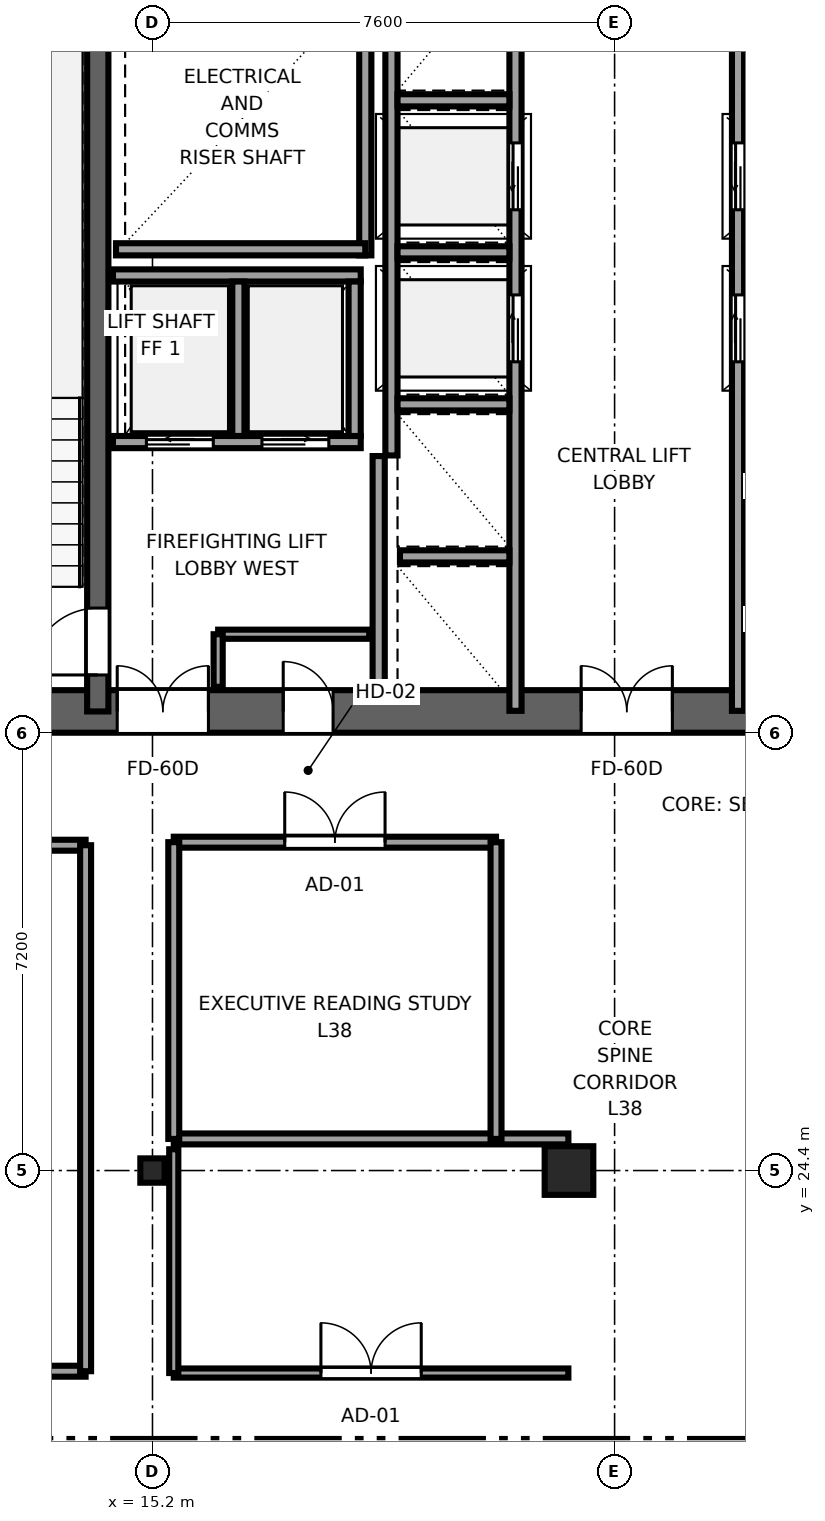
"""IFC4 building model, lengths in metres.
Left out: names, types, materials, properties, quantities, classifications, styles, units other than length and angle.
Written with IfcOpenShell. Run it as: python <this file> out.ifc"""

import sys

from ifc_helpers import new_model, si_unit, direction, frame, frame_2d, origin, origin_2d, place, context, subcontext, project, spatial, rectangle, i_section, extrude, source, transform, mapped, element, fill, save


model = new_model("IFC4")
c1 = context("Model", 3, precision=1e-05, world=origin(), true_north=direction((0.0, 1.0)))
c2 = subcontext(c1, "Body", "Model", "MODEL_VIEW")
j1 = project(units=[si_unit("LENGTHUNIT", "METRE"), si_unit("PLANEANGLEUNIT", "RADIAN")], contexts=[c1])
p1 = place(None, origin())
s1 = spatial("IfcSite", under=j1, at=p1, CompositionType="ELEMENT")
p2 = place(p1, origin())
s2 = spatial("IfcBuilding", under=s1, at=p2, CompositionType="ELEMENT")
p3 = place(p2, frame((0.0, 0.0, 147.05)))
s3 = spatial("IfcBuildingStorey", under=s2, at=p3, CompositionType="ELEMENT", Elevation=147.05)
p4 = place(p3, frame((9.8, 31.95, 0.0), z_axis=(0.0, 0.0, 1.0), x_axis=(1.0, 0.0, 0.0)))
e1 = element("IfcWall", 1, at=p4, inside=s3, PredefinedType="SHEAR", context=c2, shape_type="SweptSolid", body=[
    extrude(rectangle(XDim=26.4, YDim=0.7, at=frame_2d((13.2, 0.0))), origin(), (0.0, 0.0, 1.0), 3.55),
])
p5 = place(p4, frame((6.32, 0.0, 0.0), z_axis=(0.0, 0.0, 1.0), x_axis=(-1.0, 0.0, 0.0)))
e2 = element("IfcOpeningElement", 2, at=p5, cuts=e1, PredefinedType="OPENING", context=c2, shape_type="SweptSolid", body=[
    extrude(rectangle(XDim=1.5, YDim=2.04, at=frame_2d((0.75, 1.02))), frame((0.0, 0.36, 0.0), z_axis=(0.0, -1.0, 0.0), x_axis=(1.0, 0.0, 0.0)), (0.0, 0.0, 1.0), 0.72),
])
p6 = place(p4, frame((13.95, 0.0, 0.0), z_axis=(0.0, 0.0, 1.0), x_axis=(-1.0, 0.0, 0.0)))
e3 = element("IfcOpeningElement", 3, at=p6, cuts=e1, PredefinedType="OPENING", context=c2, shape_type="SweptSolid", body=[
    extrude(rectangle(XDim=1.5, YDim=2.04, at=frame_2d((0.75, 1.02))), frame((0.0, 0.36, 0.0), z_axis=(0.0, -1.0, 0.0), x_axis=(1.0, 0.0, 0.0)), (0.0, 0.0, 1.0), 0.72),
])
p7 = place(p4, frame((21.58, 0.0, 0.0), z_axis=(0.0, 0.0, 1.0), x_axis=(-1.0, 0.0, 0.0)))
e4 = element("IfcOpeningElement", 4, at=p7, cuts=e1, PredefinedType="OPENING", context=c2, shape_type="SweptSolid", body=[
    extrude(rectangle(XDim=1.5, YDim=2.04, at=frame_2d((0.75, 1.02))), frame((0.0, 0.36, 0.0), z_axis=(0.0, -1.0, 0.0), x_axis=(1.0, 0.0, 0.0)), (0.0, 0.0, 1.0), 0.72),
])
p8 = place(p4, frame((8.37, 0.0, 0.0), z_axis=(0.0, 0.0, 1.0), x_axis=(-1.0, 0.0, 0.0)))
e5 = element("IfcOpeningElement", 5, at=p8, cuts=e1, PredefinedType="OPENING", context=c2, shape_type="SweptSolid", body=[
    extrude(rectangle(XDim=0.82, YDim=2.01, at=frame_2d((0.41, 1.005))), frame((0.0, 0.36, 0.0), z_axis=(0.0, -1.0, 0.0), x_axis=(1.0, 0.0, 0.0)), (0.0, 0.0, 1.0), 0.72),
])
p9 = place(p4, frame((18.87, 0.0, 0.0), z_axis=(0.0, 0.0, 1.0), x_axis=(-1.0, 0.0, 0.0)))
e6 = element("IfcOpeningElement", 6, at=p9, cuts=e1, PredefinedType="OPENING", context=c2, shape_type="SweptSolid", body=[
    extrude(rectangle(XDim=0.82, YDim=2.01, at=frame_2d((0.41, 1.005))), frame((0.0, 0.36, 0.0), z_axis=(0.0, -1.0, 0.0), x_axis=(1.0, 0.0, 0.0)), (0.0, 0.0, 1.0), 0.72),
])
p10 = place(p3, frame((14.3, 31.95, 0.0), z_axis=(0.0, 0.0, 1.0), x_axis=(0.0, 1.0, 0.0)))
e7 = element("IfcWall", 7, at=p10, inside=s3, PredefinedType="SHEAR", context=c2, shape_type="SweptSolid", body=[
    extrude(rectangle(XDim=12.9, YDim=0.35, at=frame_2d((6.45, 0.0))), origin(), (0.0, 0.0, 1.0), 3.55),
])
p11 = place(p10, frame((0.6, 0.0, 0.0)))
e8 = element("IfcOpeningElement", 8, at=p11, cuts=e7, PredefinedType="OPENING", context=c2, shape_type="SweptSolid", body=[
    extrude(rectangle(XDim=1.1, YDim=2.12, at=frame_2d((0.55, 1.06))), frame((0.0, 0.185, 0.0), z_axis=(0.0, -1.0, 0.0), x_axis=(1.0, 0.0, 0.0)), (0.0, 0.0, 1.0), 0.37),
])
m1 = source(origin(), c2, "Body", "SweptSolid", [
    extrude(i_section(OverallWidth=0.4, OverallDepth=0.4, WebThickness=0.02, FlangeThickness=0.035, at=origin_2d()), origin(), (0.0, 0.0, 1.0), 3.55),
])
p12 = place(p3, frame((15.2, 24.4, 0.0), z_axis=(0.0, 0.0, 1.0), x_axis=(1.0, 0.0, 0.0)))
e9 = element("IfcColumn", 9, at=p12, inside=s3, PredefinedType="COLUMN", context=c2, shape_type="MappedRepresentation", body=[
    mapped(m1, transform((0.0, 0.0, 0.0), x_axis=(1.0, 0.0, 0.0), y_axis=(0.0, 1.0, 0.0), z_axis=(0.0, 0.0, 1.0), scale=1.0)),
])
m2 = source(origin(), c2, "Body", "SweptSolid", [
    extrude(rectangle(XDim=0.8, YDim=0.8, at=origin_2d()), origin(), (0.0, 0.0, 1.0), 3.55),
])
p13 = place(p3, frame((22.05, 24.4, 0.0), z_axis=(0.0, 0.0, 1.0), x_axis=(1.0, 0.0, 0.0)))
e10 = element("IfcColumn", 10, at=p13, inside=s3, PredefinedType="COLUMN", context=c2, shape_type="MappedRepresentation", body=[
    mapped(m2, transform((0.0, 0.0, 0.0), x_axis=(1.0, 0.0, 0.0), y_axis=(0.0, 1.0, 0.0), z_axis=(0.0, 0.0, 1.0), scale=1.0)),
])
p14 = place(p3, frame((18.7, 39.45, 0.0), z_axis=(0.0, 0.0, 1.0), x_axis=(0.0, 1.0, 0.0)))
e11 = element("IfcWall", 11, at=p14, inside=s3, PredefinedType="SOLIDWALL", context=c2, shape_type="SweptSolid", body=[
    extrude(rectangle(XDim=4.4, YDim=0.2, at=frame_2d((2.2, 0.0))), origin(), (0.0, 0.0, 1.0), 3.37),
])
p15 = place(p3, frame((14.6, 39.55, 0.0), z_axis=(0.0, 0.0, 1.0), x_axis=(1.0, 0.0, 0.0)))
e12 = element("IfcWall", 12, at=p15, inside=s3, PredefinedType="SOLIDWALL", context=c2, shape_type="SweptSolid", body=[
    extrude(rectangle(XDim=4.1, YDim=0.2, at=frame_2d((2.05, 0.0))), origin(), (0.0, 0.0, 1.0), 3.37),
])
p16 = place(p3, frame((18.92, 32.304, 0.0), z_axis=(0.0, 0.0, 1.0), x_axis=(0.0, 1.0, 0.0)))
e13 = element("IfcWall", 13, at=p16, inside=s3, PredefinedType="SOLIDWALL", context=c2, shape_type="SweptSolid", body=[
    extrude(rectangle(XDim=3.846, YDim=0.2, at=frame_2d((1.923, 0.0))), origin(), (0.0, 0.0, 1.0), 3.37),
])
p17 = place(p3, frame((21.17, 31.96, 0.0), z_axis=(0.0, 0.0, 1.0), x_axis=(0.0, 1.0, 0.0)))
e14 = element("IfcWall", 14, at=p17, inside=s3, PredefinedType="SOLIDWALL", context=c2, shape_type="SweptSolid", body=[
    extrude(rectangle(XDim=12.58, YDim=0.2, at=frame_2d((6.29, 0.0))), origin(), (0.0, 0.0, 1.0), 3.37),
])
p18 = place(p17, frame((5.74, 0.0, 0.0)))
e15 = element("IfcOpeningElement", 15, at=p18, cuts=e14, PredefinedType="OPENING", context=c2, shape_type="SweptSolid", body=[
    extrude(rectangle(XDim=1.1, YDim=2.12, at=frame_2d((0.55, 1.06))), frame((0.0, 0.11, 0.0), z_axis=(0.0, -1.0, 0.0), x_axis=(1.0, 0.0, 0.0)), (0.0, 0.0, 1.0), 0.22),
])
p19 = place(p17, frame((8.24, 0.0, 0.0)))
e16 = element("IfcOpeningElement", 16, at=p19, cuts=e14, PredefinedType="OPENING", context=c2, shape_type="SweptSolid", body=[
    extrude(rectangle(XDim=1.1, YDim=2.12, at=frame_2d((0.55, 1.06))), frame((0.0, 0.11, 0.0), z_axis=(0.0, -1.0, 0.0), x_axis=(1.0, 0.0, 0.0)), (0.0, 0.0, 1.0), 0.22),
])
p20 = place(p3, frame((19.13, 36.16, 0.0), z_axis=(0.0, 0.0, 1.0), x_axis=(0.0, 1.0, 0.0)))
e17 = element("IfcWall", 17, at=p20, inside=s3, PredefinedType="SOLIDWALL", context=c2, shape_type="SweptSolid", body=[
    extrude(rectangle(XDim=8.336, YDim=0.2, at=frame_2d((4.168, 0.0))), origin(), (0.0, 0.0, 1.0), 3.37),
])
p21 = place(p3, frame((19.27, 34.5, 0.0), z_axis=(0.0, 0.0, 1.0), x_axis=(1.0, 0.0, 0.0)))
e18 = element("IfcWall", 18, at=p21, inside=s3, PredefinedType="SOLIDWALL", context=c2, shape_type="SweptSolid", body=[
    extrude(rectangle(XDim=1.8, YDim=0.2, at=frame_2d((0.9, 0.0))), origin(), (0.0, 0.0, 1.0), 3.37),
])
for number, where, z_axis, x_axis in (
    (19, (19.23, 37.0, 0.0), (0.0, 0.0, 1.0), (1.0, 0.0, 0.0)),
    (20, (19.23, 39.5, 0.0), (0.0, 0.0, 1.0), (1.0, 0.0, 0.0)),
    (21, (19.23, 42.0, 0.0), (0.0, 0.0, 1.0), (1.0, 0.0, 0.0)),
):
    element("IfcWall", number, at=place(p3, frame(where, z_axis=z_axis, x_axis=x_axis)), inside=s3, PredefinedType="SOLIDWALL", context=c2, shape_type="SweptSolid", body=[
        extrude(rectangle(XDim=1.84, YDim=0.2, at=frame_2d((0.92, 0.0))), origin(), (0.0, 0.0, 1.0), 3.37),
    ])
p22 = place(p3, frame((14.55, 36.38, 0.0), z_axis=(0.0, 0.0, 1.0), x_axis=(1.0, 0.0, 0.0)))
e22 = element("IfcWall", 22, at=p22, inside=s3, PredefinedType="SOLIDWALL", context=c2, shape_type="SweptSolid", body=[
    extrude(rectangle(XDim=4.075, YDim=0.2, at=frame_2d((2.038, 0.0))), origin(), (0.0, 0.0, 1.0), 3.37),
])
p23 = place(p22, frame((0.55, 0.0, 0.0)))
e23 = element("IfcOpeningElement", 23, at=p23, cuts=e22, PredefinedType="OPENING", context=c2, shape_type="SweptSolid", body=[
    extrude(rectangle(XDim=1.1, YDim=2.12, at=frame_2d((0.55, 1.06))), frame((0.0, 0.11, 0.0), z_axis=(0.0, -1.0, 0.0), x_axis=(1.0, 0.0, 0.0)), (0.0, 0.0, 1.0), 0.22),
])
p24 = place(p22, frame((2.45, 0.0, 0.0)))
e24 = element("IfcOpeningElement", 24, at=p24, cuts=e22, PredefinedType="OPENING", context=c2, shape_type="SweptSolid", body=[
    extrude(rectangle(XDim=1.1, YDim=2.12, at=frame_2d((0.55, 1.06))), frame((0.0, 0.11, 0.0), z_axis=(0.0, -1.0, 0.0), x_axis=(1.0, 0.0, 0.0)), (0.0, 0.0, 1.0), 0.22),
])
p25 = place(p3, frame((14.55, 39.12, 0.0), z_axis=(0.0, 0.0, 1.0), x_axis=(1.0, 0.0, 0.0)))
e25 = element("IfcWall", 25, at=p25, inside=s3, PredefinedType="SOLIDWALL", context=c2, shape_type="SweptSolid", body=[
    extrude(rectangle(XDim=4.075, YDim=0.2, at=frame_2d((2.038, 0.0))), origin(), (0.0, 0.0, 1.0), 3.37),
])
for number, where, z_axis, x_axis in (
    (26, (18.525, 36.48, 0.0), (0.0, 0.0, 1.0), (0.0, 1.0, 0.0)),
    (27, (16.613, 36.48, 0.0), (0.0, 0.0, 1.0), (0.0, 1.0, 0.0)),
):
    element("IfcWall", number, at=place(p3, frame(where, z_axis=z_axis, x_axis=x_axis)), inside=s3, PredefinedType="SOLIDWALL", context=c2, shape_type="SweptSolid", body=[
        extrude(rectangle(XDim=2.54, YDim=0.2, at=frame_2d((1.27, 0.0))), origin(), (0.0, 0.0, 1.0), 3.37),
    ])
p26 = place(p3, frame((24.83, 31.96, 0.0), z_axis=(0.0, 0.0, 1.0), x_axis=(0.0, 1.0, 0.0)))
e28 = element("IfcWall", 28, at=p26, inside=s3, PredefinedType="SOLIDWALL", context=c2, shape_type="SweptSolid", body=[
    extrude(rectangle(XDim=12.58, YDim=0.2, at=frame_2d((6.29, 0.0))), origin(), (0.0, 0.0, 1.0), 3.37),
])
p27 = place(p26, frame((5.74, 0.0, 0.0)))
e29 = element("IfcOpeningElement", 29, at=p27, cuts=e28, PredefinedType="OPENING", context=c2, shape_type="SweptSolid", body=[
    extrude(rectangle(XDim=1.1, YDim=2.12, at=frame_2d((0.55, 1.06))), frame((0.0, 0.11, 0.0), z_axis=(0.0, -1.0, 0.0), x_axis=(1.0, 0.0, 0.0)), (0.0, 0.0, 1.0), 0.22),
])
p28 = place(p26, frame((8.24, 0.0, 0.0)))
e30 = element("IfcOpeningElement", 30, at=p28, cuts=e28, PredefinedType="OPENING", context=c2, shape_type="SweptSolid", body=[
    extrude(rectangle(XDim=1.1, YDim=2.12, at=frame_2d((0.55, 1.06))), frame((0.0, 0.11, 0.0), z_axis=(0.0, -1.0, 0.0), x_axis=(1.0, 0.0, 0.0)), (0.0, 0.0, 1.0), 0.22),
])
p29 = place(p3, frame((24.93, 34.5, 0.0), z_axis=(0.0, 0.0, 1.0), x_axis=(1.0, 0.0, 0.0)))
e31 = element("IfcWall", 31, at=p29, inside=s3, PredefinedType="SOLIDWALL", context=c2, shape_type="SweptSolid", body=[
    extrude(rectangle(XDim=1.8, YDim=0.2, at=frame_2d((0.9, 0.0))), origin(), (0.0, 0.0, 1.0), 3.37),
])
for number, where, z_axis, x_axis in (
    (32, (24.93, 37.0, 0.0), (0.0, 0.0, 1.0), (1.0, 0.0, 0.0)),
    (33, (24.93, 39.5, 0.0), (0.0, 0.0, 1.0), (1.0, 0.0, 0.0)),
    (34, (24.93, 42.0, 0.0), (0.0, 0.0, 1.0), (1.0, 0.0, 0.0)),
):
    element("IfcWall", number, at=place(p3, frame(where, z_axis=z_axis, x_axis=x_axis)), inside=s3, PredefinedType="SOLIDWALL", context=c2, shape_type="SweptSolid", body=[
        extrude(rectangle(XDim=1.84, YDim=0.2, at=frame_2d((0.92, 0.0))), origin(), (0.0, 0.0, 1.0), 3.37),
    ])
p30 = place(p3, frame((16.28, 33.22, 0.0), z_axis=(0.0, 0.0, 1.0), x_axis=(1.0, 0.0, 0.0)))
e35 = element("IfcWall", 35, at=p30, inside=s3, PredefinedType="PARTITIONING", context=c2, shape_type="SweptSolid", body=[
    extrude(rectangle(XDim=2.485, YDim=0.15, at=frame_2d((1.242, 0.0))), origin(), (0.0, 0.0, 1.0), 3.37),
])
p31 = place(p3, frame((16.28, 32.355, 0.0), z_axis=(0.0, 0.0, 1.0), x_axis=(0.0, 1.0, 0.0)))
e36 = element("IfcWall", 36, at=p31, inside=s3, PredefinedType="PARTITIONING", context=c2, shape_type="SweptSolid", body=[
    extrude(rectangle(XDim=0.865, YDim=0.15, at=frame_2d((0.433, 0.0))), origin(), (0.0, 0.0, 1.0), 3.37),
])
p32 = place(p3, frame((9.88, 21.1, 0.0), z_axis=(0.0, 0.0, 1.0), x_axis=(1.0, 0.0, 0.0)))
e37 = element("IfcWall", 37, at=p32, inside=s3, PredefinedType="PARTITIONING", context=c2, shape_type="SweptSolid", body=[
    extrude(rectangle(XDim=4.22, YDim=0.18, at=frame_2d((2.11, 0.0))), origin(), (0.0, 0.0, 1.0), 3.37),
])
p33 = place(p32, frame((1.285, 0.0, 0.0)))
e38 = element("IfcOpeningElement", 38, at=p33, cuts=e37, PredefinedType="OPENING", context=c2, shape_type="SweptSolid", body=[
    extrude(rectangle(XDim=1.65, YDim=2.15, at=frame_2d((0.825, 1.075))), frame((0.0, 0.1, 0.0), z_axis=(0.0, -1.0, 0.0), x_axis=(1.0, 0.0, 0.0)), (0.0, 0.0, 1.0), 0.2),
])
p34 = place(p3, frame((9.88, 29.75, 0.0), z_axis=(0.0, 0.0, 1.0), x_axis=(1.0, 0.0, 0.0)))
e39 = element("IfcWall", 39, at=p34, inside=s3, PredefinedType="PARTITIONING", context=c2, shape_type="SweptSolid", body=[
    extrude(rectangle(XDim=4.22, YDim=0.18, at=frame_2d((2.11, 0.0))), origin(), (0.0, 0.0, 1.0), 3.37),
])
p35 = place(p3, frame((14.1, 21.1, 0.0), z_axis=(0.0, 0.0, 1.0), x_axis=(0.0, 1.0, 0.0)))
e40 = element("IfcWall", 40, at=p35, inside=s3, PredefinedType="PARTITIONING", context=c2, shape_type="SweptSolid", body=[
    extrude(rectangle(XDim=8.65, YDim=0.18, at=frame_2d((4.325, 0.0))), origin(), (0.0, 0.0, 1.0), 3.37),
])
p36 = place(p3, frame((15.55, 24.92, 0.0), z_axis=(0.0, 0.0, 1.0), x_axis=(1.0, 0.0, 0.0)))
e41 = element("IfcWall", 41, at=p36, inside=s3, PredefinedType="PARTITIONING", context=c2, shape_type="SweptSolid", body=[
    extrude(rectangle(XDim=6.49, YDim=0.18, at=frame_2d((3.245, 0.0))), origin(), (0.0, 0.0, 1.0), 3.37),
])
p37 = place(p3, frame((15.55, 29.8, 0.0), z_axis=(0.0, 0.0, 1.0), x_axis=(1.0, 0.0, 0.0)))
e42 = element("IfcWall", 42, at=p37, inside=s3, PredefinedType="PARTITIONING", context=c2, shape_type="SweptSolid", body=[
    extrude(rectangle(XDim=5.3, YDim=0.18, at=frame_2d((2.65, 0.0))), origin(), (0.0, 0.0, 1.0), 3.37),
])
p38 = place(p37, frame((1.825, 0.0, 0.0)))
e43 = element("IfcOpeningElement", 43, at=p38, cuts=e42, PredefinedType="OPENING", context=c2, shape_type="SweptSolid", body=[
    extrude(rectangle(XDim=1.65, YDim=2.15, at=frame_2d((0.825, 1.075))), frame((0.0, 0.1, 0.0), z_axis=(0.0, -1.0, 0.0), x_axis=(1.0, 0.0, 0.0)), (0.0, 0.0, 1.0), 0.2),
])
for number, where, z_axis, x_axis in (
    (44, (15.55, 24.92, 0.0), (0.0, 0.0, 1.0), (0.0, 1.0, 0.0)),
    (45, (20.85, 24.92, 0.0), (0.0, 0.0, 1.0), (0.0, 1.0, 0.0)),
):
    element("IfcWall", number, at=place(p3, frame(where, z_axis=z_axis, x_axis=x_axis)), inside=s3, PredefinedType="PARTITIONING", context=c2, shape_type="SweptSolid", body=[
        extrude(rectangle(XDim=4.88, YDim=0.18, at=frame_2d((2.44, 0.0))), origin(), (0.0, 0.0, 1.0), 3.37),
    ])
p39 = place(p3, frame((15.55, 21.07, 0.0), z_axis=(0.0, 0.0, 1.0), x_axis=(1.0, 0.0, 0.0)))
e46 = element("IfcWall", 46, at=p39, inside=s3, PredefinedType="PARTITIONING", context=c2, shape_type="SweptSolid", body=[
    extrude(rectangle(XDim=6.49, YDim=0.15, at=frame_2d((3.245, 0.0))), origin(), (0.0, 0.0, 1.0), 3.37),
])
p40 = place(p39, frame((2.42, 0.0, 0.0)))
e47 = element("IfcOpeningElement", 47, at=p40, cuts=e46, PredefinedType="OPENING", context=c2, shape_type="SweptSolid", body=[
    extrude(rectangle(XDim=1.65, YDim=2.15, at=frame_2d((0.825, 1.075))), frame((0.0, 0.085, 0.0), z_axis=(0.0, -1.0, 0.0), x_axis=(1.0, 0.0, 0.0)), (0.0, 0.0, 1.0), 0.17),
])
p41 = place(p3, frame((15.55, 21.07, 0.0), z_axis=(0.0, 0.0, 1.0), x_axis=(0.0, 1.0, 0.0)))
e48 = element("IfcWall", 48, at=p41, inside=s3, PredefinedType="PARTITIONING", context=c2, shape_type="SweptSolid", body=[
    extrude(rectangle(XDim=3.68, YDim=0.15, at=frame_2d((1.84, 0.0))), origin(), (0.0, 0.0, 1.0), 3.37),
])
m3 = source(origin(), c2, "Body", "SweptSolid", [
    extrude(rectangle(XDim=1.1, YDim=2.12, at=frame_2d((0.55, 1.06))), frame((0.0, 0.025, 0.0), z_axis=(0.0, -1.0, 0.0), x_axis=(1.0, 0.0, 0.0)), (0.0, 0.0, 1.0), 0.05),
])
p42 = place(p11, origin())
e49 = element("IfcDoor", 49, at=p42, inside=s3, OperationType="SINGLE_SWING_LEFT", PredefinedType="DOOR", context=c2, shape_type="MappedRepresentation", body=[
    mapped(m3, transform((0.0, 0.0, 0.0), x_axis=(1.0, 0.0, 0.0), y_axis=(0.0, 1.0, 0.0), z_axis=(0.0, 0.0, 1.0), scale=1.0)),
])
fill(e8, e49)
m4 = source(origin(), c2, "Body", "SweptSolid", [
    extrude(rectangle(XDim=1.5, YDim=2.04, at=frame_2d((0.75, 1.02))), frame((0.0, 0.025, 0.0), z_axis=(0.0, -1.0, 0.0), x_axis=(1.0, 0.0, 0.0)), (0.0, 0.0, 1.0), 0.05),
])
p43 = place(p5, origin())
e50 = element("IfcDoor", 50, at=p43, inside=s3, OperationType="DOUBLE_DOOR_SINGLE_SWING", PredefinedType="DOOR", context=c2, shape_type="MappedRepresentation", body=[
    mapped(m4, transform((0.0, 0.0, 0.0), x_axis=(1.0, 0.0, 0.0), y_axis=(0.0, 1.0, 0.0), z_axis=(0.0, 0.0, 1.0), scale=1.0)),
])
fill(e2, e50)
p44 = place(p6, origin())
e51 = element("IfcDoor", 51, at=p44, inside=s3, OperationType="DOUBLE_DOOR_SINGLE_SWING", PredefinedType="DOOR", context=c2, shape_type="MappedRepresentation", body=[
    mapped(m4, transform((0.0, 0.0, 0.0), x_axis=(1.0, 0.0, 0.0), y_axis=(0.0, 1.0, 0.0), z_axis=(0.0, 0.0, 1.0), scale=1.0)),
])
fill(e3, e51)
m5 = source(origin(), c2, "Body", "SweptSolid", [
    extrude(rectangle(XDim=0.82, YDim=2.01, at=frame_2d((0.41, 1.005))), frame((0.0, 0.025, 0.0), z_axis=(0.0, -1.0, 0.0), x_axis=(1.0, 0.0, 0.0)), (0.0, 0.0, 1.0), 0.05),
])
p45 = place(p8, origin())
e52 = element("IfcDoor", 52, at=p45, inside=s3, OperationType="SINGLE_SWING_LEFT", PredefinedType="DOOR", context=c2, shape_type="MappedRepresentation", body=[
    mapped(m5, transform((0.0, 0.0, 0.0), x_axis=(1.0, 0.0, 0.0), y_axis=(0.0, 1.0, 0.0), z_axis=(0.0, 0.0, 1.0), scale=1.0)),
])
fill(e5, e52)
m6 = source(origin(), c2, "Body", "SweptSolid", [
    extrude(rectangle(XDim=1.1, YDim=2.12, at=frame_2d((0.55, 1.06))), frame((0.0, 0.025, 0.0), z_axis=(0.0, -1.0, 0.0), x_axis=(1.0, 0.0, 0.0)), (0.0, 0.0, 1.0), 0.05),
])
p46 = place(p18, origin())
e53 = element("IfcDoor", 53, at=p46, inside=s3, OperationType="SLIDING_TO_RIGHT", PredefinedType="DOOR", context=c2, shape_type="MappedRepresentation", body=[
    mapped(m6, transform((0.0, 0.0, 0.0), x_axis=(1.0, 0.0, 0.0), y_axis=(0.0, 1.0, 0.0), z_axis=(0.0, 0.0, 1.0), scale=1.0)),
])
fill(e15, e53)
p47 = place(p19, origin())
e54 = element("IfcDoor", 54, at=p47, inside=s3, OperationType="SLIDING_TO_LEFT", PredefinedType="DOOR", context=c2, shape_type="MappedRepresentation", body=[
    mapped(m6, transform((0.0, 0.0, 0.0), x_axis=(1.0, 0.0, 0.0), y_axis=(0.0, 1.0, 0.0), z_axis=(0.0, 0.0, 1.0), scale=1.0)),
])
fill(e16, e54)
p48 = place(p23, origin())
e55 = element("IfcDoor", 55, at=p48, inside=s3, OperationType="SLIDING_TO_LEFT", PredefinedType="DOOR", context=c2, shape_type="MappedRepresentation", body=[
    mapped(m6, transform((0.0, 0.0, 0.0), x_axis=(1.0, 0.0, 0.0), y_axis=(0.0, 1.0, 0.0), z_axis=(0.0, 0.0, 1.0), scale=1.0)),
])
fill(e23, e55)
p49 = place(p24, origin())
e56 = element("IfcDoor", 56, at=p49, inside=s3, OperationType="SLIDING_TO_RIGHT", PredefinedType="DOOR", context=c2, shape_type="MappedRepresentation", body=[
    mapped(m6, transform((0.0, 0.0, 0.0), x_axis=(1.0, 0.0, 0.0), y_axis=(0.0, 1.0, 0.0), z_axis=(0.0, 0.0, 1.0), scale=1.0)),
])
fill(e24, e56)
p50 = place(p27, origin())
e57 = element("IfcDoor", 57, at=p50, inside=s3, OperationType="SLIDING_TO_RIGHT", PredefinedType="DOOR", context=c2, shape_type="MappedRepresentation", body=[
    mapped(m6, transform((0.0, 0.0, 0.0), x_axis=(1.0, 0.0, 0.0), y_axis=(0.0, 1.0, 0.0), z_axis=(0.0, 0.0, 1.0), scale=1.0)),
])
fill(e29, e57)
p51 = place(p28, origin())
e58 = element("IfcDoor", 58, at=p51, inside=s3, OperationType="SLIDING_TO_LEFT", PredefinedType="DOOR", context=c2, shape_type="MappedRepresentation", body=[
    mapped(m6, transform((0.0, 0.0, 0.0), x_axis=(1.0, 0.0, 0.0), y_axis=(0.0, 1.0, 0.0), z_axis=(0.0, 0.0, 1.0), scale=1.0)),
])
fill(e30, e58)
m7 = source(origin(), c2, "Body", "SweptSolid", [
    extrude(rectangle(XDim=1.65, YDim=2.15, at=frame_2d((0.825, 1.075))), frame((0.0, 0.025, 0.0), z_axis=(0.0, -1.0, 0.0), x_axis=(1.0, 0.0, 0.0)), (0.0, 0.0, 1.0), 0.05),
])
p52 = place(p38, origin())
e59 = element("IfcDoor", 59, at=p52, inside=s3, OperationType="DOUBLE_DOOR_SINGLE_SWING", PredefinedType="DOOR", context=c2, shape_type="MappedRepresentation", body=[
    mapped(m7, transform((0.0, 0.0, 0.0), x_axis=(1.0, 0.0, 0.0), y_axis=(0.0, 1.0, 0.0), z_axis=(0.0, 0.0, 1.0), scale=1.0)),
])
fill(e43, e59)
p53 = place(p40, origin())
e60 = element("IfcDoor", 60, at=p53, inside=s3, OperationType="DOUBLE_DOOR_SINGLE_SWING", PredefinedType="DOOR", context=c2, shape_type="MappedRepresentation", body=[
    mapped(m7, transform((0.0, 0.0, 0.0), x_axis=(1.0, 0.0, 0.0), y_axis=(0.0, 1.0, 0.0), z_axis=(0.0, 0.0, 1.0), scale=1.0)),
])
fill(e47, e60)
save(model, sys.argv[1])
